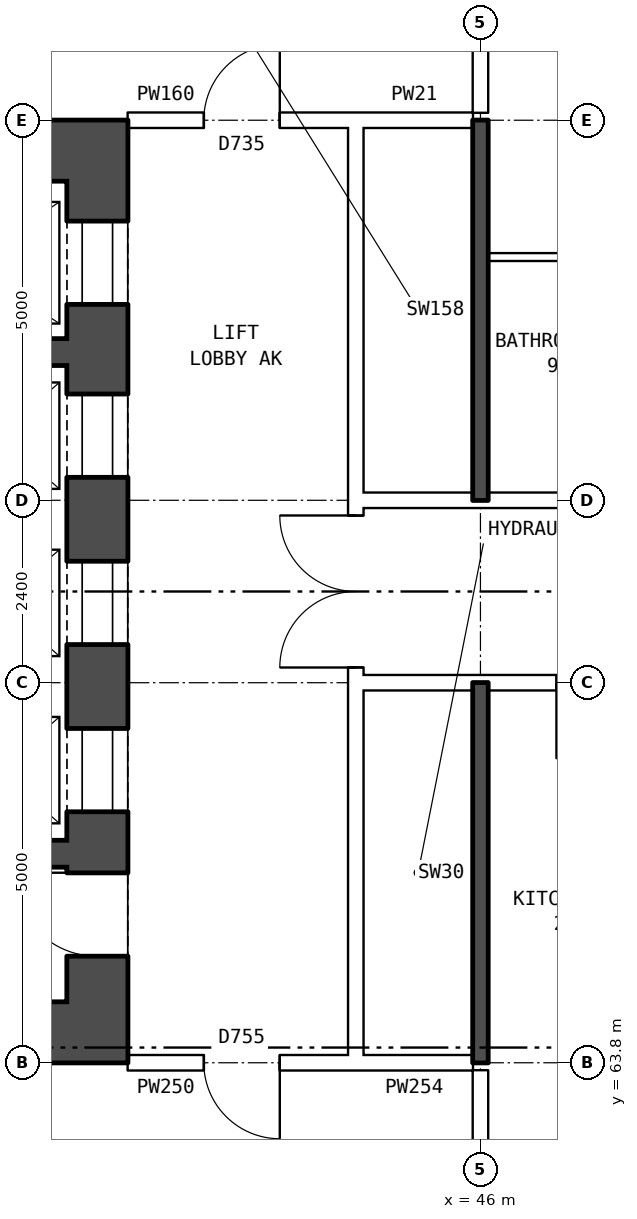
"""IFC4 building model, lengths in metres.
Left out: names, types, materials, properties, quantities, classifications, styles, units other than length and angle.
Written with IfcOpenShell. Run it as: python <this file> out.ifc"""

import sys

from ifc_helpers import new_model, si_unit, direction, frame, frame_2d, origin, place, context, subcontext, project, spatial, rectangle, extrude, element, fill, save


model = new_model("IFC4")
c1 = context("Model", 3, precision=1e-05, world=origin(), true_north=direction((0.0, 1.0)))
c2 = subcontext(c1, "Body", "Model", "MODEL_VIEW")
j1 = project(units=[si_unit("LENGTHUNIT", "METRE"), si_unit("PLANEANGLEUNIT", "RADIAN")], contexts=[c1])
p1 = place(None, origin())
s1 = spatial("IfcSite", under=j1, at=p1, CompositionType="ELEMENT")
p2 = place(p1, origin())
s2 = spatial("IfcBuilding", under=s1, at=p2, CompositionType="ELEMENT")
p3 = place(p2, frame((0.0, 0.0, 59.8)))
s3 = spatial("IfcBuildingStorey", under=s2, at=p3, CompositionType="ELEMENT", Elevation=59.8)
p4 = place(p3, frame((40.96, 75.4, 0.0), z_axis=(0.0, 0.0, 1.0), x_axis=(0.0, -1.0, 0.0)))
e1 = element("IfcWall", 1, at=p4, inside=s3, PredefinedType="SHEAR", context=c2, shape_type="SweptSolid", body=[
    extrude(rectangle(XDim=10.8, YDim=0.8, at=frame_2d((5.4, 0.0))), origin(), (0.0, 0.0, 1.0), 2.85),
])
p5 = place(p4, frame((0.525, 0.0, 0.0)))
e2 = element("IfcOpeningElement", 2, at=p5, cuts=e1, PredefinedType="OPENING", context=c2, shape_type="SweptSolid", body=[
    extrude(rectangle(XDim=1.1, YDim=2.1, at=frame_2d((0.55, 1.05))), frame((0.0, 0.41, 0.0), z_axis=(0.0, -1.0, 0.0), x_axis=(1.0, 0.0, 0.0)), (0.0, 0.0, 1.0), 0.82),
])
p6 = place(p4, frame((2.8, 0.0, 0.0)))
e3 = element("IfcOpeningElement", 3, at=p6, cuts=e1, PredefinedType="OPENING", context=c2, shape_type="SweptSolid", body=[
    extrude(rectangle(XDim=1.1, YDim=2.1, at=frame_2d((0.55, 1.05))), frame((0.0, 0.41, 0.0), z_axis=(0.0, -1.0, 0.0), x_axis=(1.0, 0.0, 0.0)), (0.0, 0.0, 1.0), 0.82),
])
p7 = place(p4, frame((5.0, 0.0, 0.0)))
e4 = element("IfcOpeningElement", 4, at=p7, cuts=e1, PredefinedType="OPENING", context=c2, shape_type="SweptSolid", body=[
    extrude(rectangle(XDim=1.1, YDim=2.1, at=frame_2d((0.55, 1.05))), frame((0.0, 0.41, 0.0), z_axis=(0.0, -1.0, 0.0), x_axis=(1.0, 0.0, 0.0)), (0.0, 0.0, 1.0), 0.82),
])
p8 = place(p4, frame((7.2, 0.0, 0.0)))
e5 = element("IfcOpeningElement", 5, at=p8, cuts=e1, PredefinedType="OPENING", context=c2, shape_type="SweptSolid", body=[
    extrude(rectangle(XDim=1.1, YDim=2.1, at=frame_2d((0.55, 1.05))), frame((0.0, 0.41, 0.0), z_axis=(0.0, -1.0, 0.0), x_axis=(1.0, 0.0, 0.0)), (0.0, 0.0, 1.0), 0.82),
])
p9 = place(p4, frame((9.1, 0.0, 0.0)))
e6 = element("IfcOpeningElement", 6, at=p9, cuts=e1, PredefinedType="OPENING", context=c2, shape_type="SweptSolid", body=[
    extrude(rectangle(XDim=1.1, YDim=2.1, at=frame_2d((0.55, 1.05))), frame((0.0, 0.41, 0.0), z_axis=(0.0, -1.0, 0.0), x_axis=(1.0, 0.0, 0.0)), (0.0, 0.0, 1.0), 0.82),
])
for number, where, z_axis, x_axis in (
    (7, (41.36, 75.8, 0.0), (0.0, 0.0, 1.0), (-1.0, 0.0, 0.0)),
    (8, (41.36, 64.2, 0.0), (0.0, 0.0, 1.0), (-1.0, 0.0, 0.0)),
):
    element("IfcWall", number, at=place(p3, frame(where, z_axis=z_axis, x_axis=x_axis)), inside=s3, PredefinedType="SHEAR", context=c2, shape_type="SweptSolid", body=[
        extrude(rectangle(XDim=9.0, YDim=0.8, at=frame_2d((4.5, 0.0))), origin(), (0.0, 0.0, 1.0), 2.85),
    ])
p10 = place(p3, frame((40.56, 73.15, 0.0), z_axis=(0.0, 0.0, 1.0), x_axis=(-1.0, 0.0, 0.0)))
e9 = element("IfcWall", 9, at=p10, inside=s3, PredefinedType="SHEAR", context=c2, shape_type="SweptSolid", body=[
    extrude(rectangle(XDim=3.245, YDim=0.35, at=frame_2d((1.623, 0.0))), origin(), (0.0, 0.0, 1.0), 2.85),
])
p11 = place(p3, frame((40.56, 66.55, 0.0), z_axis=(0.0, 0.0, 1.0), x_axis=(-1.0, 0.0, 0.0)))
e10 = element("IfcWall", 10, at=p11, inside=s3, PredefinedType="SHEAR", context=c2, shape_type="SweptSolid", body=[
    extrude(rectangle(XDim=2.075, YDim=0.35, at=frame_2d((1.038, 0.0))), origin(), (0.0, 0.0, 1.0), 2.85),
])
p12 = place(p3, frame((44.36, 63.9, 0.0), z_axis=(0.0, 0.0, 1.0), x_axis=(0.0, 1.0, 0.0)))
e11 = element("IfcWall", 11, at=p12, inside=s3, PredefinedType="PARTITIONING", context=c2, shape_type="SweptSolid", body=[
    extrude(rectangle(XDim=12.2, YDim=0.2, at=frame_2d((6.1, 0.0))), origin(), (0.0, 0.0, 1.0), 2.85),
])
p13 = place(p12, frame((5.1, 0.0, 0.0)))
e12 = element("IfcOpeningElement", 12, at=p13, cuts=e11, PredefinedType="OPENING", context=c2, shape_type="SweptSolid", body=[
    extrude(rectangle(XDim=2.0, YDim=2.1, at=frame_2d((1.0, 1.05))), frame((0.0, 0.11, 0.0), z_axis=(0.0, -1.0, 0.0), x_axis=(1.0, 0.0, 0.0)), (0.0, 0.0, 1.0), 0.22),
])
p14 = place(p3, frame((41.36, 63.8, 0.0), z_axis=(0.0, 0.0, 1.0), x_axis=(1.0, 0.0, 0.0)))
e13 = element("IfcWall", 13, at=p14, inside=s3, PredefinedType="PARTITIONING", context=c2, shape_type="SweptSolid", body=[
    extrude(rectangle(XDim=3.0, YDim=0.2, at=frame_2d((1.5, 0.0))), origin(), (0.0, 0.0, 1.0), 2.85),
])
p15 = place(p14, frame((1.0, 0.0, 0.0)))
e14 = element("IfcOpeningElement", 14, at=p15, cuts=e13, PredefinedType="OPENING", context=c2, shape_type="SweptSolid", body=[
    extrude(rectangle(XDim=1.0, YDim=2.1, at=frame_2d((0.5, 1.05))), frame((0.0, 0.11, 0.0), z_axis=(0.0, -1.0, 0.0), x_axis=(1.0, 0.0, 0.0)), (0.0, 0.0, 1.0), 0.22),
])
p16 = place(p3, frame((44.36, 63.8, 0.0), z_axis=(0.0, 0.0, 1.0), x_axis=(1.0, 0.0, 0.0)))
e15 = element("IfcWall", 15, at=p16, inside=s3, PredefinedType="PARTITIONING", context=c2, shape_type="SweptSolid", body=[
    extrude(rectangle(XDim=1.54, YDim=0.2, at=frame_2d((0.77, 0.0))), origin(), (0.0, 0.0, 1.0), 2.85),
])
p17 = place(p3, frame((44.36, 68.8, 0.0), z_axis=(0.0, 0.0, 1.0), x_axis=(1.0, 0.0, 0.0)))
e16 = element("IfcWall", 16, at=p17, inside=s3, PredefinedType="PARTITIONING", context=c2, shape_type="SweptSolid", body=[
    extrude(rectangle(XDim=19.28, YDim=0.2, at=frame_2d((9.64, 0.0))), origin(), (0.0, 0.0, 1.0), 2.85),
])
p18 = place(p17, frame((17.46, 0.0, 0.0)))
e17 = element("IfcOpeningElement", 17, at=p18, cuts=e16, PredefinedType="OPENING", context=c2, shape_type="SweptSolid", body=[
    extrude(rectangle(XDim=1.0, YDim=2.1, at=frame_2d((0.5, 1.05))), frame((0.0, 0.11, 0.0), z_axis=(0.0, -1.0, 0.0), x_axis=(1.0, 0.0, 0.0)), (0.0, 0.0, 1.0), 0.22),
])
p19 = place(p17, frame((11.64, 0.0, 0.0)))
e18 = element("IfcOpeningElement", 18, at=p19, cuts=e16, PredefinedType="OPENING", context=c2, shape_type="SweptSolid", body=[
    extrude(rectangle(XDim=1.0, YDim=2.1, at=frame_2d((0.5, 1.05))), frame((0.0, 0.11, 0.0), z_axis=(0.0, -1.0, 0.0), x_axis=(1.0, 0.0, 0.0)), (0.0, 0.0, 1.0), 0.22),
])
p20 = place(p17, frame((2.64, 0.0, 0.0)))
e19 = element("IfcOpeningElement", 19, at=p20, cuts=e16, PredefinedType="OPENING", context=c2, shape_type="SweptSolid", body=[
    extrude(rectangle(XDim=1.0, YDim=2.1, at=frame_2d((0.5, 1.05))), frame((0.0, 0.11, 0.0), z_axis=(0.0, -1.0, 0.0), x_axis=(1.0, 0.0, 0.0)), (0.0, 0.0, 1.0), 0.22),
])
p21 = place(p3, frame((44.36, 71.2, 0.0), z_axis=(0.0, 0.0, 1.0), x_axis=(1.0, 0.0, 0.0)))
e20 = element("IfcWall", 20, at=p21, inside=s3, PredefinedType="PARTITIONING", context=c2, shape_type="SweptSolid", body=[
    extrude(rectangle(XDim=19.28, YDim=0.2, at=frame_2d((9.64, 0.0))), origin(), (0.0, 0.0, 1.0), 2.85),
])
p22 = place(p21, frame((17.46, 0.0, 0.0)))
e21 = element("IfcOpeningElement", 21, at=p22, cuts=e20, PredefinedType="OPENING", context=c2, shape_type="SweptSolid", body=[
    extrude(rectangle(XDim=1.0, YDim=2.1, at=frame_2d((0.5, 1.05))), frame((0.0, 0.11, 0.0), z_axis=(0.0, -1.0, 0.0), x_axis=(1.0, 0.0, 0.0)), (0.0, 0.0, 1.0), 0.22),
])
p23 = place(p21, frame((8.64, 0.0, 0.0)))
e22 = element("IfcOpeningElement", 22, at=p23, cuts=e20, PredefinedType="OPENING", context=c2, shape_type="SweptSolid", body=[
    extrude(rectangle(XDim=1.0, YDim=2.1, at=frame_2d((0.5, 1.05))), frame((0.0, 0.11, 0.0), z_axis=(0.0, -1.0, 0.0), x_axis=(1.0, 0.0, 0.0)), (0.0, 0.0, 1.0), 0.22),
])
p24 = place(p21, frame((5.64, 0.0, 0.0)))
e23 = element("IfcOpeningElement", 23, at=p24, cuts=e20, PredefinedType="OPENING", context=c2, shape_type="SweptSolid", body=[
    extrude(rectangle(XDim=1.0, YDim=2.1, at=frame_2d((0.5, 1.05))), frame((0.0, 0.11, 0.0), z_axis=(0.0, -1.0, 0.0), x_axis=(1.0, 0.0, 0.0)), (0.0, 0.0, 1.0), 0.22),
])
p25 = place(p3, frame((46.1, 74.4, 0.0), z_axis=(0.0, 0.0, 1.0), x_axis=(1.0, 0.0, 0.0)))
e24 = element("IfcWall", 24, at=p25, inside=s3, PredefinedType="PARTITIONING", context=c2, shape_type="SweptSolid", body=[
    extrude(rectangle(XDim=2.9, YDim=0.1, at=frame_2d((1.45, 0.0))), origin(), (0.0, 0.0, 1.0), 2.85),
])
p26 = place(p3, frame((41.36, 76.2, 0.0), z_axis=(0.0, 0.0, 1.0), x_axis=(1.0, 0.0, 0.0)))
e25 = element("IfcWall", 25, at=p26, inside=s3, PredefinedType="PARTITIONING", context=c2, shape_type="SweptSolid", body=[
    extrude(rectangle(XDim=3.0, YDim=0.2, at=frame_2d((1.5, 0.0))), origin(), (0.0, 0.0, 1.0), 2.85),
])
p27 = place(p26, frame((1.0, 0.0, 0.0)))
e26 = element("IfcOpeningElement", 26, at=p27, cuts=e25, PredefinedType="OPENING", context=c2, shape_type="SweptSolid", body=[
    extrude(rectangle(XDim=1.0, YDim=2.1, at=frame_2d((0.5, 1.05))), frame((0.0, 0.11, 0.0), z_axis=(0.0, -1.0, 0.0), x_axis=(1.0, 0.0, 0.0)), (0.0, 0.0, 1.0), 0.22),
])
p28 = place(p3, frame((44.36, 76.2, 0.0), z_axis=(0.0, 0.0, 1.0), x_axis=(1.0, 0.0, 0.0)))
e27 = element("IfcWall", 27, at=p28, inside=s3, PredefinedType="PARTITIONING", context=c2, shape_type="SweptSolid", body=[
    extrude(rectangle(XDim=1.54, YDim=0.2, at=frame_2d((0.77, 0.0))), origin(), (0.0, 0.0, 1.0), 2.85),
])
p29 = place(p3, frame((46.0, 61.5, 0.0), z_axis=(0.0, 0.0, 1.0), x_axis=(0.0, 1.0, 0.0)))
e28 = element("IfcWall", 28, at=p29, inside=s3, PredefinedType="PARTITIONING", context=c2, shape_type="SweptSolid", body=[
    extrude(rectangle(XDim=2.2, YDim=0.2, at=frame_2d((1.1, 0.0))), origin(), (0.0, 0.0, 1.0), 2.85),
])
for number, where, z_axis, x_axis in (
    (29, (46.0, 63.8, 0.0), (0.0, 0.0, 1.0), (0.0, 1.0, 0.0)),
    (30, (46.0, 71.2, 0.0), (0.0, 0.0, 1.0), (0.0, 1.0, 0.0)),
):
    element("IfcWall", number, at=place(p3, frame(where, z_axis=z_axis, x_axis=x_axis)), inside=s3, PredefinedType="SOLIDWALL", context=c2, shape_type="SweptSolid", body=[
        extrude(rectangle(XDim=5.0, YDim=0.2, at=frame_2d((2.5, 0.0))), origin(), (0.0, 0.0, 1.0), 2.85),
    ])
p30 = place(p3, frame((46.0, 76.3, 0.0), z_axis=(0.0, 0.0, 1.0), x_axis=(0.0, 1.0, 0.0)))
e31 = element("IfcWall", 31, at=p30, inside=s3, PredefinedType="PARTITIONING", context=c2, shape_type="SweptSolid", body=[
    extrude(rectangle(XDim=2.2, YDim=0.2, at=frame_2d((1.1, 0.0))), origin(), (0.0, 0.0, 1.0), 2.85),
])
p31 = place(p5, origin())
e32 = element("IfcDoor", 32, at=p31, inside=s3, OperationType="DOUBLE_DOOR_SLIDING", PredefinedType="DOOR", context=c2, shape_type="SweptSolid", body=[
    extrude(rectangle(XDim=1.1, YDim=2.1, at=frame_2d((0.55, 1.05))), frame((0.0, -0.335, 0.0), z_axis=(0.0, -1.0, 0.0), x_axis=(1.0, 0.0, 0.0)), (0.0, 0.0, 1.0), 0.05),
])
fill(e2, e32)
p32 = place(p6, origin())
e33 = element("IfcDoor", 33, at=p32, inside=s3, OperationType="DOUBLE_DOOR_SLIDING", PredefinedType="DOOR", context=c2, shape_type="SweptSolid", body=[
    extrude(rectangle(XDim=1.1, YDim=2.1, at=frame_2d((0.55, 1.05))), frame((0.0, -0.335, 0.0), z_axis=(0.0, -1.0, 0.0), x_axis=(1.0, 0.0, 0.0)), (0.0, 0.0, 1.0), 0.05),
])
fill(e3, e33)
p33 = place(p7, origin())
e34 = element("IfcDoor", 34, at=p33, inside=s3, OperationType="DOUBLE_DOOR_SLIDING", PredefinedType="DOOR", context=c2, shape_type="SweptSolid", body=[
    extrude(rectangle(XDim=1.1, YDim=2.1, at=frame_2d((0.55, 1.05))), frame((0.0, -0.335, 0.0), z_axis=(0.0, -1.0, 0.0), x_axis=(1.0, 0.0, 0.0)), (0.0, 0.0, 1.0), 0.05),
])
fill(e4, e34)
p34 = place(p8, origin())
e35 = element("IfcDoor", 35, at=p34, inside=s3, OperationType="DOUBLE_DOOR_SLIDING", PredefinedType="DOOR", context=c2, shape_type="SweptSolid", body=[
    extrude(rectangle(XDim=1.1, YDim=2.1, at=frame_2d((0.55, 1.05))), frame((0.0, -0.335, 0.0), z_axis=(0.0, -1.0, 0.0), x_axis=(1.0, 0.0, 0.0)), (0.0, 0.0, 1.0), 0.05),
])
fill(e5, e35)
p35 = place(p9, frame((1.1, 0.0, 0.0), z_axis=(0.0, 0.0, 1.0), x_axis=(-1.0, 0.0, 0.0)))
e36 = element("IfcDoor", 36, at=p35, inside=s3, OperationType="SINGLE_SWING_RIGHT", PredefinedType="DOOR", context=c2, shape_type="SweptSolid", body=[
    extrude(rectangle(XDim=1.1, YDim=2.1, at=frame_2d((0.55, 1.05))), frame((0.0, 0.385, 0.0), z_axis=(0.0, -1.0, 0.0), x_axis=(1.0, 0.0, 0.0)), (0.0, 0.0, 1.0), 0.05),
])
fill(e6, e36)
p36 = place(p13, origin())
e37 = element("IfcDoor", 37, at=p36, inside=s3, OperationType="DOUBLE_DOOR_SINGLE_SWING", PredefinedType="DOOR", context=c2, shape_type="SweptSolid", body=[
    extrude(rectangle(XDim=2.0, YDim=2.1, at=frame_2d((1.0, 1.05))), frame((0.0, 0.025, 0.0), z_axis=(0.0, -1.0, 0.0), x_axis=(1.0, 0.0, 0.0)), (0.0, 0.0, 1.0), 0.05),
])
fill(e12, e37)
p37 = place(p15, frame((1.0, 0.0, 0.0), z_axis=(0.0, 0.0, 1.0), x_axis=(-1.0, 0.0, 0.0)))
e38 = element("IfcDoor", 38, at=p37, inside=s3, OperationType="SINGLE_SWING_LEFT", PredefinedType="DOOR", context=c2, shape_type="SweptSolid", body=[
    extrude(rectangle(XDim=1.0, YDim=2.1, at=frame_2d((0.5, 1.05))), frame((0.0, 0.025, 0.0), z_axis=(0.0, -1.0, 0.0), x_axis=(1.0, 0.0, 0.0)), (0.0, 0.0, 1.0), 0.05),
])
fill(e14, e38)
p38 = place(p27, origin())
e39 = element("IfcDoor", 39, at=p38, inside=s3, OperationType="SINGLE_SWING_RIGHT", PredefinedType="DOOR", context=c2, shape_type="SweptSolid", body=[
    extrude(rectangle(XDim=1.0, YDim=2.1, at=frame_2d((0.5, 1.05))), frame((0.0, 0.025, 0.0), z_axis=(0.0, -1.0, 0.0), x_axis=(1.0, 0.0, 0.0)), (0.0, 0.0, 1.0), 0.05),
])
fill(e26, e39)
save(model, sys.argv[1])
